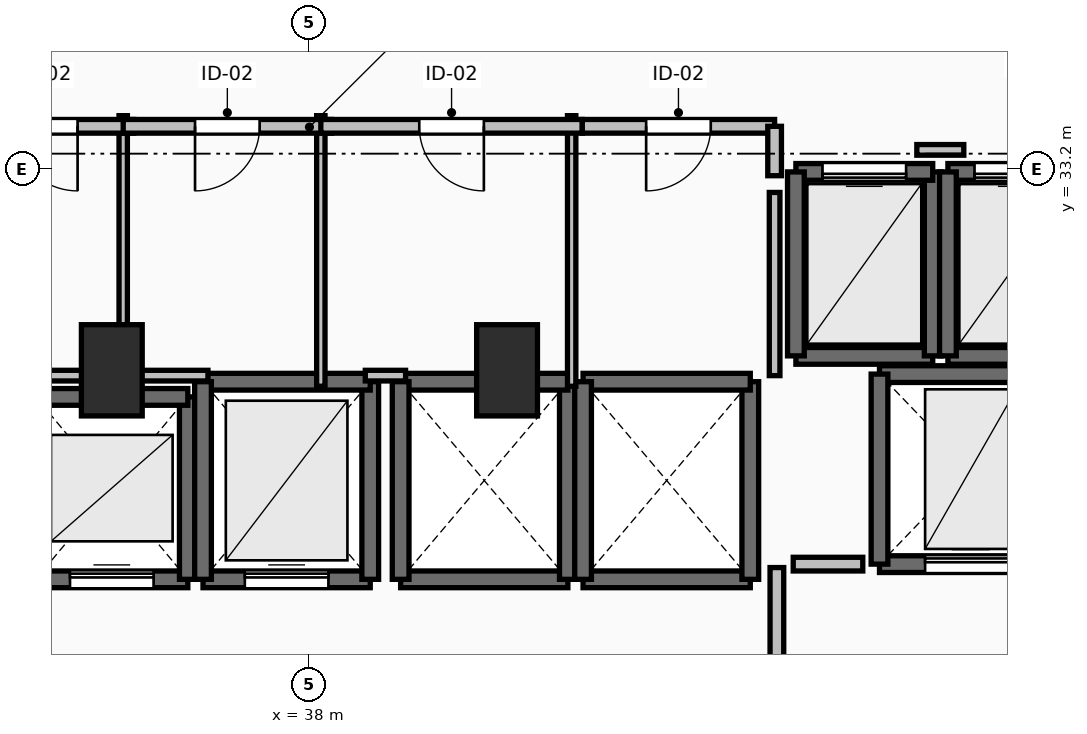
"""IFC4 building model, lengths in metres.
Left out: names, types, materials, properties, quantities, classifications, styles, units other than length and angle.
Written with IfcOpenShell. Run it as: python <this file> out.ifc"""

import sys

from ifc_helpers import new_model, si_unit, direction, frame, frame_2d, origin, origin_2d, place, context, subcontext, project, spatial, rectangle, extrude, element, fill, save


model = new_model("IFC4")
c1 = context("Model", 3, precision=1e-05, world=origin(), true_north=direction((0.0, 1.0)))
c2 = subcontext(c1, "Body", "Model", "MODEL_VIEW")
j1 = project(units=[si_unit("LENGTHUNIT", "METRE"), si_unit("PLANEANGLEUNIT", "RADIAN")], contexts=[c1])
p1 = place(None, origin())
s1 = spatial("IfcSite", under=j1, at=p1, CompositionType="ELEMENT")
p2 = place(p1, origin())
s2 = spatial("IfcBuilding", under=s1, at=p2, CompositionType="ELEMENT")
p3 = place(p2, frame((0.0, 0.0, 74.3)))
s3 = spatial("IfcBuildingStorey", under=s2, at=p3, CompositionType="ELEMENT", Elevation=74.3)
for number, where, z_axis, x_axis in (
    (1, (35.4, 30.55, 0.0), (0.0, 0.0, 1.0), (1.0, 0.0, 0.0)),
    (2, (40.6, 30.55, 0.0), (0.0, 0.0, 1.0), (1.0, 0.0, 0.0)),
):
    element("IfcColumn", number, at=place(p3, frame(where, z_axis=z_axis, x_axis=x_axis)), inside=s3, PredefinedType="PILASTER", context=c2, shape_type="SweptSolid", body=[
        extrude(rectangle(XDim=0.8, YDim=1.2, at=origin_2d()), origin(), (0.0, 0.0, 1.0), 4.5),
    ])
p4 = place(p3, frame((34.4, 27.8, 0.0), z_axis=(0.0, 0.0, 1.0), x_axis=(1.0, 0.0, 0.0)))
e3 = element("IfcWall", 3, at=p4, inside=s3, PredefinedType="SOLIDWALL", context=c2, shape_type="SweptSolid", body=[
    extrude(rectangle(XDim=2.0, YDim=0.22, at=frame_2d((1.0, 0.0))), origin(), (0.0, 0.0, 1.0), 4.24),
])
p5 = place(p4, frame((0.45, 0.0, 0.0)))
e4 = element("IfcOpeningElement", 4, at=p5, cuts=e3, PredefinedType="OPENING", context=c2, shape_type="SweptSolid", body=[
    extrude(rectangle(XDim=1.1, YDim=2.2, at=frame_2d((0.55, 1.1))), frame((0.0, 0.125, 0.0), z_axis=(0.0, -1.0, 0.0), x_axis=(1.0, 0.0, 0.0)), (0.0, 0.0, 1.0), 0.25),
])
p6 = place(p3, frame((36.4, 27.8, 0.0), z_axis=(0.0, 0.0, 1.0), x_axis=(0.0, 1.0, 0.0)))
e5 = element("IfcWall", 5, at=p6, inside=s3, PredefinedType="SOLIDWALL", context=c2, shape_type="SweptSolid", body=[
    extrude(rectangle(XDim=2.4, YDim=0.22, at=frame_2d((1.2, 0.0))), origin(), (0.0, 0.0, 1.0), 4.24),
])
p7 = place(p3, frame((36.4, 30.2, 0.0), z_axis=(0.0, 0.0, 1.0), x_axis=(-1.0, 0.0, 0.0)))
e6 = element("IfcWall", 6, at=p7, inside=s3, PredefinedType="SOLIDWALL", context=c2, shape_type="SweptSolid", body=[
    extrude(rectangle(XDim=2.0, YDim=0.22, at=frame_2d((1.0, 0.0))), origin(), (0.0, 0.0, 1.0), 4.24),
])
p8 = place(p3, frame((36.6, 27.8, 0.0), z_axis=(0.0, 0.0, 1.0), x_axis=(1.0, 0.0, 0.0)))
e7 = element("IfcWall", 7, at=p8, inside=s3, PredefinedType="SOLIDWALL", context=c2, shape_type="SweptSolid", body=[
    extrude(rectangle(XDim=2.2, YDim=0.22, at=frame_2d((1.1, 0.0))), origin(), (0.0, 0.0, 1.0), 4.24),
])
p9 = place(p8, frame((0.55, 0.0, 0.0)))
e8 = element("IfcOpeningElement", 8, at=p9, cuts=e7, PredefinedType="OPENING", context=c2, shape_type="SweptSolid", body=[
    extrude(rectangle(XDim=1.1, YDim=2.2, at=frame_2d((0.55, 1.1))), frame((0.0, 0.125, 0.0), z_axis=(0.0, -1.0, 0.0), x_axis=(1.0, 0.0, 0.0)), (0.0, 0.0, 1.0), 0.25),
])
p10 = place(p3, frame((38.8, 27.8, 0.0), z_axis=(0.0, 0.0, 1.0), x_axis=(0.0, 1.0, 0.0)))
e9 = element("IfcWall", 9, at=p10, inside=s3, PredefinedType="SOLIDWALL", context=c2, shape_type="SweptSolid", body=[
    extrude(rectangle(XDim=2.6, YDim=0.22, at=frame_2d((1.3, 0.0))), origin(), (0.0, 0.0, 1.0), 4.24),
])
p11 = place(p3, frame((38.8, 30.4, 0.0), z_axis=(0.0, 0.0, 1.0), x_axis=(-1.0, 0.0, 0.0)))
e10 = element("IfcWall", 10, at=p11, inside=s3, PredefinedType="SOLIDWALL", context=c2, shape_type="SweptSolid", body=[
    extrude(rectangle(XDim=2.2, YDim=0.22, at=frame_2d((1.1, 0.0))), origin(), (0.0, 0.0, 1.0), 4.24),
])
p12 = place(p3, frame((36.6, 30.4, 0.0), z_axis=(0.0, 0.0, 1.0), x_axis=(0.0, -1.0, 0.0)))
e11 = element("IfcWall", 11, at=p12, inside=s3, PredefinedType="SOLIDWALL", context=c2, shape_type="SweptSolid", body=[
    extrude(rectangle(XDim=2.6, YDim=0.22, at=frame_2d((1.3, 0.0))), origin(), (0.0, 0.0, 1.0), 4.24),
])
p13 = place(p3, frame((39.2, 27.8, 0.0), z_axis=(0.0, 0.0, 1.0), x_axis=(1.0, 0.0, 0.0)))
e12 = element("IfcWall", 12, at=p13, inside=s3, PredefinedType="SOLIDWALL", context=c2, shape_type="SweptSolid", body=[
    extrude(rectangle(XDim=2.2, YDim=0.22, at=frame_2d((1.1, 0.0))), origin(), (0.0, 0.0, 1.0), 4.24),
])
p14 = place(p3, frame((41.4, 27.8, 0.0), z_axis=(0.0, 0.0, 1.0), x_axis=(0.0, 1.0, 0.0)))
e13 = element("IfcWall", 13, at=p14, inside=s3, PredefinedType="SOLIDWALL", context=c2, shape_type="SweptSolid", body=[
    extrude(rectangle(XDim=2.6, YDim=0.22, at=frame_2d((1.3, 0.0))), origin(), (0.0, 0.0, 1.0), 4.24),
])
p15 = place(p3, frame((41.4, 30.4, 0.0), z_axis=(0.0, 0.0, 1.0), x_axis=(-1.0, 0.0, 0.0)))
e14 = element("IfcWall", 14, at=p15, inside=s3, PredefinedType="SOLIDWALL", context=c2, shape_type="SweptSolid", body=[
    extrude(rectangle(XDim=2.2, YDim=0.22, at=frame_2d((1.1, 0.0))), origin(), (0.0, 0.0, 1.0), 4.24),
])
p16 = place(p3, frame((39.2, 30.4, 0.0), z_axis=(0.0, 0.0, 1.0), x_axis=(0.0, -1.0, 0.0)))
e15 = element("IfcWall", 15, at=p16, inside=s3, PredefinedType="SOLIDWALL", context=c2, shape_type="SweptSolid", body=[
    extrude(rectangle(XDim=2.6, YDim=0.22, at=frame_2d((1.3, 0.0))), origin(), (0.0, 0.0, 1.0), 4.24),
])
p17 = place(p3, frame((41.6, 27.8, 0.0), z_axis=(0.0, 0.0, 1.0), x_axis=(1.0, 0.0, 0.0)))
e16 = element("IfcWall", 16, at=p17, inside=s3, PredefinedType="SOLIDWALL", context=c2, shape_type="SweptSolid", body=[
    extrude(rectangle(XDim=2.2, YDim=0.22, at=frame_2d((1.1, 0.0))), origin(), (0.0, 0.0, 1.0), 4.24),
])
p18 = place(p3, frame((43.8, 27.8, 0.0), z_axis=(0.0, 0.0, 1.0), x_axis=(0.0, 1.0, 0.0)))
e17 = element("IfcWall", 17, at=p18, inside=s3, PredefinedType="SOLIDWALL", context=c2, shape_type="SweptSolid", body=[
    extrude(rectangle(XDim=2.6, YDim=0.22, at=frame_2d((1.3, 0.0))), origin(), (0.0, 0.0, 1.0), 4.24),
])
p19 = place(p3, frame((43.8, 30.4, 0.0), z_axis=(0.0, 0.0, 1.0), x_axis=(-1.0, 0.0, 0.0)))
e18 = element("IfcWall", 18, at=p19, inside=s3, PredefinedType="SOLIDWALL", context=c2, shape_type="SweptSolid", body=[
    extrude(rectangle(XDim=2.2, YDim=0.22, at=frame_2d((1.1, 0.0))), origin(), (0.0, 0.0, 1.0), 4.24),
])
p20 = place(p3, frame((41.6, 30.4, 0.0), z_axis=(0.0, 0.0, 1.0), x_axis=(0.0, -1.0, 0.0)))
e19 = element("IfcWall", 19, at=p20, inside=s3, PredefinedType="SOLIDWALL", context=c2, shape_type="SweptSolid", body=[
    extrude(rectangle(XDim=2.6, YDim=0.22, at=frame_2d((1.3, 0.0))), origin(), (0.0, 0.0, 1.0), 4.24),
])
p21 = place(p3, frame((44.4, 30.74, 0.0), z_axis=(0.0, 0.0, 1.0), x_axis=(1.0, 0.0, 0.0)))
e20 = element("IfcWall", 20, at=p21, inside=s3, PredefinedType="SOLIDWALL", context=c2, shape_type="SweptSolid", body=[
    extrude(rectangle(XDim=1.8, YDim=0.22, at=frame_2d((0.9, 0.0))), origin(), (0.0, 0.0, 1.0), 4.24),
])
p22 = place(p3, frame((46.2, 30.74, 0.0), z_axis=(0.0, 0.0, 1.0), x_axis=(0.0, 1.0, 0.0)))
e21 = element("IfcWall", 21, at=p22, inside=s3, PredefinedType="SOLIDWALL", context=c2, shape_type="SweptSolid", body=[
    extrude(rectangle(XDim=2.42, YDim=0.22, at=frame_2d((1.21, 0.0))), origin(), (0.0, 0.0, 1.0), 4.24),
])
p23 = place(p3, frame((46.2, 33.16, 0.0), z_axis=(0.0, 0.0, 1.0), x_axis=(-1.0, 0.0, 0.0)))
e22 = element("IfcWall", 22, at=p23, inside=s3, PredefinedType="SOLIDWALL", context=c2, shape_type="SweptSolid", body=[
    extrude(rectangle(XDim=1.8, YDim=0.22, at=frame_2d((0.9, 0.0))), origin(), (0.0, 0.0, 1.0), 4.24),
])
p24 = place(p23, frame((0.35, 0.0, 0.0)))
e23 = element("IfcOpeningElement", 23, at=p24, cuts=e22, PredefinedType="OPENING", context=c2, shape_type="SweptSolid", body=[
    extrude(rectangle(XDim=1.1, YDim=2.2, at=frame_2d((0.55, 1.1))), frame((0.0, 0.125, 0.0), z_axis=(0.0, -1.0, 0.0), x_axis=(1.0, 0.0, 0.0)), (0.0, 0.0, 1.0), 0.25),
])
p25 = place(p3, frame((44.4, 33.16, 0.0), z_axis=(0.0, 0.0, 1.0), x_axis=(0.0, -1.0, 0.0)))
e24 = element("IfcWall", 24, at=p25, inside=s3, PredefinedType="SOLIDWALL", context=c2, shape_type="SweptSolid", body=[
    extrude(rectangle(XDim=2.42, YDim=0.22, at=frame_2d((1.21, 0.0))), origin(), (0.0, 0.0, 1.0), 4.24),
])
p26 = place(p3, frame((46.4, 30.74, 0.0), z_axis=(0.0, 0.0, 1.0), x_axis=(1.0, 0.0, 0.0)))
e25 = element("IfcWall", 25, at=p26, inside=s3, PredefinedType="SOLIDWALL", context=c2, shape_type="SweptSolid", body=[
    extrude(rectangle(XDim=1.8, YDim=0.22, at=frame_2d((0.9, 0.0))), origin(), (0.0, 0.0, 1.0), 4.24),
])
p27 = place(p3, frame((48.2, 33.16, 0.0), z_axis=(0.0, 0.0, 1.0), x_axis=(-1.0, 0.0, 0.0)))
e26 = element("IfcWall", 26, at=p27, inside=s3, PredefinedType="SOLIDWALL", context=c2, shape_type="SweptSolid", body=[
    extrude(rectangle(XDim=1.8, YDim=0.22, at=frame_2d((0.9, 0.0))), origin(), (0.0, 0.0, 1.0), 4.24),
])
p28 = place(p27, frame((0.35, 0.0, 0.0)))
e27 = element("IfcOpeningElement", 27, at=p28, cuts=e26, PredefinedType="OPENING", context=c2, shape_type="SweptSolid", body=[
    extrude(rectangle(XDim=1.1, YDim=2.2, at=frame_2d((0.55, 1.1))), frame((0.0, 0.125, 0.0), z_axis=(0.0, -1.0, 0.0), x_axis=(1.0, 0.0, 0.0)), (0.0, 0.0, 1.0), 0.25),
])
p29 = place(p3, frame((46.4, 33.16, 0.0), z_axis=(0.0, 0.0, 1.0), x_axis=(0.0, -1.0, 0.0)))
e28 = element("IfcWall", 28, at=p29, inside=s3, PredefinedType="SOLIDWALL", context=c2, shape_type="SweptSolid", body=[
    extrude(rectangle(XDim=2.42, YDim=0.22, at=frame_2d((1.21, 0.0))), origin(), (0.0, 0.0, 1.0), 4.24),
])
p30 = place(p3, frame((45.5, 28.0, 0.0), z_axis=(0.0, 0.0, 1.0), x_axis=(1.0, 0.0, 0.0)))
e29 = element("IfcWall", 29, at=p30, inside=s3, PredefinedType="SHEAR", context=c2, shape_type="SweptSolid", body=[
    extrude(rectangle(XDim=2.4, YDim=0.22, at=frame_2d((1.2, 0.0))), origin(), (0.0, 0.0, 1.0), 4.24),
])
p31 = place(p30, frame((0.6, 0.0, 0.0)))
e30 = element("IfcOpeningElement", 30, at=p31, cuts=e29, PredefinedType="OPENING", context=c2, shape_type="SweptSolid", body=[
    extrude(rectangle(XDim=1.2, YDim=2.2, at=frame_2d((0.6, 1.1))), frame((0.0, 0.125, 0.0), z_axis=(0.0, -1.0, 0.0), x_axis=(1.0, 0.0, 0.0)), (0.0, 0.0, 1.0), 0.25),
])
p32 = place(p3, frame((47.9, 30.5, 0.0), z_axis=(0.0, 0.0, 1.0), x_axis=(-1.0, 0.0, 0.0)))
e31 = element("IfcWall", 31, at=p32, inside=s3, PredefinedType="SHEAR", context=c2, shape_type="SweptSolid", body=[
    extrude(rectangle(XDim=2.4, YDim=0.22, at=frame_2d((1.2, 0.0))), origin(), (0.0, 0.0, 1.0), 4.24),
])
p33 = place(p3, frame((45.5, 30.5, 0.0), z_axis=(0.0, 0.0, 1.0), x_axis=(0.0, -1.0, 0.0)))
e32 = element("IfcWall", 32, at=p33, inside=s3, PredefinedType="SHEAR", context=c2, shape_type="SweptSolid", body=[
    extrude(rectangle(XDim=2.5, YDim=0.22, at=frame_2d((1.25, 0.0))), origin(), (0.0, 0.0, 1.0), 4.24),
])
p34 = place(p3, frame((44.15, 27.955, 0.0), z_axis=(0.0, 0.0, 1.0), x_axis=(0.0, -1.0, 0.0)))
e33 = element("IfcWall", 33, at=p34, inside=s3, PredefinedType="PARTITIONING", context=c2, shape_type="SweptSolid", body=[
    extrude(rectangle(XDim=3.91, YDim=0.18, at=frame_2d((1.955, 0.0))), origin(), (0.0, 0.0, 1.0), 4.24),
])
p35 = place(p34, frame((1.355, 0.0, 0.0)))
e34 = element("IfcOpeningElement", 34, at=p35, cuts=e33, PredefinedType="OPENING", context=c2, shape_type="SweptSolid", body=[
    extrude(rectangle(XDim=1.2, YDim=2.15, at=frame_2d((0.6, 1.075))), frame((0.0, 0.105, 0.0), z_axis=(0.0, -1.0, 0.0), x_axis=(1.0, 0.0, 0.0)), (0.0, 0.0, 1.0), 0.21),
])
p36 = place(p3, frame((35.55, 30.34, 0.0), z_axis=(0.0, 0.0, 1.0), x_axis=(0.0, 1.0, 0.0)))
e35 = element("IfcWall", 35, at=p36, inside=s3, PredefinedType="PARTITIONING", context=c2, shape_type="SweptSolid", body=[
    extrude(rectangle(XDim=3.56, YDim=0.11, at=frame_2d((1.78, 0.0))), origin(), (0.0, 0.0, 1.0), 3.432),
])
p37 = place(p3, frame((35.69, 33.76, 0.0), z_axis=(0.0, 0.0, 1.0), x_axis=(-1.0, 0.0, 0.0)))
e36 = element("IfcWall", 36, at=p37, inside=s3, PredefinedType="PARTITIONING", context=c2, shape_type="SweptSolid", body=[
    extrude(rectangle(XDim=2.33, YDim=0.18, at=frame_2d((1.165, 0.0))), origin(), (0.0, 0.0, 1.0), 4.24),
])
p38 = place(p37, frame((0.74, 0.0, 0.0)))
e37 = element("IfcOpeningElement", 37, at=p38, cuts=e36, PredefinedType="OPENING", context=c2, shape_type="SweptSolid", body=[
    extrude(rectangle(XDim=0.85, YDim=2.1, at=frame_2d((0.425, 1.05))), frame((0.0, 0.105, 0.0), z_axis=(0.0, -1.0, 0.0), x_axis=(1.0, 0.0, 0.0)), (0.0, 0.0, 1.0), 0.21),
])
p39 = place(p3, frame((38.15, 30.34, 0.0), z_axis=(0.0, 0.0, 1.0), x_axis=(0.0, 1.0, 0.0)))
e38 = element("IfcWall", 38, at=p39, inside=s3, PredefinedType="PARTITIONING", context=c2, shape_type="SweptSolid", body=[
    extrude(rectangle(XDim=3.56, YDim=0.11, at=frame_2d((1.78, 0.0))), origin(), (0.0, 0.0, 1.0), 3.432),
])
p40 = place(p3, frame((38.29, 33.76, 0.0), z_axis=(0.0, 0.0, 1.0), x_axis=(-1.0, 0.0, 0.0)))
e39 = element("IfcWall", 39, at=p40, inside=s3, PredefinedType="PARTITIONING", context=c2, shape_type="SweptSolid", body=[
    extrude(rectangle(XDim=2.74, YDim=0.18, at=frame_2d((1.37, 0.0))), origin(), (0.0, 0.0, 1.0), 4.24),
])
p41 = place(p40, frame((0.945, 0.0, 0.0)))
e40 = element("IfcOpeningElement", 40, at=p41, cuts=e39, PredefinedType="OPENING", context=c2, shape_type="SweptSolid", body=[
    extrude(rectangle(XDim=0.85, YDim=2.1, at=frame_2d((0.425, 1.05))), frame((0.0, 0.105, 0.0), z_axis=(0.0, -1.0, 0.0), x_axis=(1.0, 0.0, 0.0)), (0.0, 0.0, 1.0), 0.21),
])
p42 = place(p3, frame((41.45, 30.34, 0.0), z_axis=(0.0, 0.0, 1.0), x_axis=(0.0, 1.0, 0.0)))
e41 = element("IfcWall", 41, at=p42, inside=s3, PredefinedType="PARTITIONING", context=c2, shape_type="SweptSolid", body=[
    extrude(rectangle(XDim=3.56, YDim=0.11, at=frame_2d((1.78, 0.0))), origin(), (0.0, 0.0, 1.0), 4.24),
])
p43 = place(p3, frame((41.59, 33.76, 0.0), z_axis=(0.0, 0.0, 1.0), x_axis=(-1.0, 0.0, 0.0)))
e42 = element("IfcWall", 42, at=p43, inside=s3, PredefinedType="PARTITIONING", context=c2, shape_type="SweptSolid", body=[
    extrude(rectangle(XDim=3.44, YDim=0.18, at=frame_2d((1.72, 0.0))), origin(), (0.0, 0.0, 1.0), 4.24),
])
p44 = place(p43, frame((1.295, 0.0, 0.0)))
e43 = element("IfcOpeningElement", 43, at=p44, cuts=e42, PredefinedType="OPENING", context=c2, shape_type="SweptSolid", body=[
    extrude(rectangle(XDim=0.85, YDim=2.1, at=frame_2d((0.425, 1.05))), frame((0.0, 0.105, 0.0), z_axis=(0.0, -1.0, 0.0), x_axis=(1.0, 0.0, 0.0)), (0.0, 0.0, 1.0), 0.21),
])
p45 = place(p3, frame((44.12, 33.76, 0.0), z_axis=(0.0, 0.0, 1.0), x_axis=(-1.0, 0.0, 0.0)))
e44 = element("IfcWall", 44, at=p45, inside=s3, PredefinedType="PARTITIONING", context=c2, shape_type="SweptSolid", body=[
    extrude(rectangle(XDim=2.53, YDim=0.18, at=frame_2d((1.265, 0.0))), origin(), (0.0, 0.0, 1.0), 4.24),
])
p46 = place(p45, frame((0.84, 0.0, 0.0)))
e45 = element("IfcOpeningElement", 45, at=p46, cuts=e44, PredefinedType="OPENING", context=c2, shape_type="SweptSolid", body=[
    extrude(rectangle(XDim=0.85, YDim=2.1, at=frame_2d((0.425, 1.05))), frame((0.0, 0.105, 0.0), z_axis=(0.0, -1.0, 0.0), x_axis=(1.0, 0.0, 0.0)), (0.0, 0.0, 1.0), 0.21),
])
p47 = place(p3, frame((44.12, 33.11, 0.0), z_axis=(0.0, 0.0, 1.0), x_axis=(0.0, 1.0, 0.0)))
e46 = element("IfcWall", 46, at=p47, inside=s3, PredefinedType="PARTITIONING", context=c2, shape_type="SweptSolid", body=[
    extrude(rectangle(XDim=0.65, YDim=0.18, at=frame_2d((0.325, 0.0))), origin(), (0.0, 0.0, 1.0), 4.24),
])
p48 = place(p3, frame((45.28, 28.0, 0.0), z_axis=(0.0, 0.0, 1.0), x_axis=(-1.0, 0.0, 0.0)))
e47 = element("IfcWall", 47, at=p48, inside=s3, PredefinedType="PARTITIONING", context=c2, shape_type="SweptSolid", body=[
    extrude(rectangle(XDim=0.915, YDim=0.18, at=frame_2d((0.458, 0.0))), origin(), (0.0, 0.0, 1.0), 4.24),
])
p49 = place(p3, frame((33.44, 30.48, 0.0), z_axis=(0.0, 0.0, 1.0), x_axis=(1.0, 0.0, 0.0)))
e48 = element("IfcWall", 48, at=p49, inside=s3, PredefinedType="PARTITIONING", context=c2, shape_type="SweptSolid", body=[
    extrude(rectangle(XDim=2.14, YDim=0.14, at=frame_2d((1.07, 0.0))), origin(), (0.0, 0.0, 1.0), 3.432),
])
p50 = place(p3, frame((35.6, 30.48, 0.0), z_axis=(0.0, 0.0, 1.0), x_axis=(1.0, 0.0, 0.0)))
e49 = element("IfcWall", 49, at=p50, inside=s3, PredefinedType="PARTITIONING", context=c2, shape_type="SweptSolid", body=[
    extrude(rectangle(XDim=1.065, YDim=0.14, at=frame_2d((0.532, 0.0))), origin(), (0.0, 0.0, 1.0), 3.432),
])
p51 = place(p3, frame((38.735, 30.48, 0.0), z_axis=(0.0, 0.0, 1.0), x_axis=(1.0, 0.0, 0.0)))
e50 = element("IfcWall", 50, at=p51, inside=s3, PredefinedType="PARTITIONING", context=c2, shape_type="SweptSolid", body=[
    extrude(rectangle(XDim=0.53, YDim=0.14, at=frame_2d((0.265, 0.0))), origin(), (0.0, 0.0, 1.0), 3.432),
])
p52 = place(p3, frame((44.12, 30.48, 0.0), z_axis=(0.0, 0.0, 1.0), x_axis=(0.0, 1.0, 0.0)))
e51 = element("IfcWall", 51, at=p52, inside=s3, PredefinedType="PARTITIONING", context=c2, shape_type="SweptSolid", body=[
    extrude(rectangle(XDim=2.41, YDim=0.14, at=frame_2d((1.205, 0.0))), origin(), (0.0, 0.0, 1.0), 4.24),
])
p53 = place(p3, frame((45.991, 33.45, 0.0), z_axis=(0.0, 0.0, 1.0), x_axis=(1.0, 0.0, 0.0)))
e52 = element("IfcWall", 52, at=p53, inside=s3, PredefinedType="PARTITIONING", context=c2, shape_type="SweptSolid", body=[
    extrude(rectangle(XDim=0.618, YDim=0.14, at=frame_2d((0.309, 0.0))), origin(), (0.0, 0.0, 1.0), 4.24),
])
p54 = place(p5, origin())
e53 = element("IfcDoor", 53, at=p54, inside=s3, OperationType="SLIDING_TO_LEFT", PredefinedType="DOOR", context=c2, shape_type="SweptSolid", body=[
    extrude(rectangle(XDim=1.1, YDim=2.2, at=frame_2d((0.55, 1.1))), frame((0.0, 0.025, 0.0), z_axis=(0.0, -1.0, 0.0), x_axis=(1.0, 0.0, 0.0)), (0.0, 0.0, 1.0), 0.05),
])
fill(e4, e53)
p55 = place(p9, origin())
e54 = element("IfcDoor", 54, at=p55, inside=s3, OperationType="SLIDING_TO_LEFT", PredefinedType="DOOR", context=c2, shape_type="SweptSolid", body=[
    extrude(rectangle(XDim=1.1, YDim=2.2, at=frame_2d((0.55, 1.1))), frame((0.0, 0.025, 0.0), z_axis=(0.0, -1.0, 0.0), x_axis=(1.0, 0.0, 0.0)), (0.0, 0.0, 1.0), 0.05),
])
fill(e8, e54)
p56 = place(p24, origin())
e55 = element("IfcDoor", 55, at=p56, inside=s3, OperationType="SLIDING_TO_LEFT", PredefinedType="DOOR", context=c2, shape_type="SweptSolid", body=[
    extrude(rectangle(XDim=1.1, YDim=2.2, at=frame_2d((0.55, 1.1))), frame((0.0, 0.025, 0.0), z_axis=(0.0, -1.0, 0.0), x_axis=(1.0, 0.0, 0.0)), (0.0, 0.0, 1.0), 0.05),
])
fill(e23, e55)
p57 = place(p28, origin())
e56 = element("IfcDoor", 56, at=p57, inside=s3, OperationType="SLIDING_TO_LEFT", PredefinedType="DOOR", context=c2, shape_type="SweptSolid", body=[
    extrude(rectangle(XDim=1.1, YDim=2.2, at=frame_2d((0.55, 1.1))), frame((0.0, 0.025, 0.0), z_axis=(0.0, -1.0, 0.0), x_axis=(1.0, 0.0, 0.0)), (0.0, 0.0, 1.0), 0.05),
])
fill(e27, e56)
p58 = place(p31, origin())
e57 = element("IfcDoor", 57, at=p58, inside=s3, OperationType="SLIDING_TO_LEFT", PredefinedType="DOOR", context=c2, shape_type="SweptSolid", body=[
    extrude(rectangle(XDim=1.2, YDim=2.2, at=frame_2d((0.6, 1.1))), frame((0.0, 0.025, 0.0), z_axis=(0.0, -1.0, 0.0), x_axis=(1.0, 0.0, 0.0)), (0.0, 0.0, 1.0), 0.05),
])
fill(e30, e57)
p59 = place(p38, origin())
e58 = element("IfcDoor", 58, at=p59, inside=s3, OperationType="SINGLE_SWING_LEFT", PredefinedType="DOOR", context=c2, shape_type="SweptSolid", body=[
    extrude(rectangle(XDim=0.85, YDim=2.1, at=frame_2d((0.425, 1.05))), frame((0.0, 0.025, 0.0), z_axis=(0.0, -1.0, 0.0), x_axis=(1.0, 0.0, 0.0)), (0.0, 0.0, 1.0), 0.05),
])
fill(e37, e58)
p60 = place(p41, origin())
e59 = element("IfcDoor", 59, at=p60, inside=s3, OperationType="SINGLE_SWING_RIGHT", PredefinedType="DOOR", context=c2, shape_type="SweptSolid", body=[
    extrude(rectangle(XDim=0.85, YDim=2.1, at=frame_2d((0.425, 1.05))), frame((0.0, 0.025, 0.0), z_axis=(0.0, -1.0, 0.0), x_axis=(1.0, 0.0, 0.0)), (0.0, 0.0, 1.0), 0.05),
])
fill(e40, e59)
p61 = place(p44, origin())
e60 = element("IfcDoor", 60, at=p61, inside=s3, OperationType="SINGLE_SWING_LEFT", PredefinedType="DOOR", context=c2, shape_type="SweptSolid", body=[
    extrude(rectangle(XDim=0.85, YDim=2.1, at=frame_2d((0.425, 1.05))), frame((0.0, 0.025, 0.0), z_axis=(0.0, -1.0, 0.0), x_axis=(1.0, 0.0, 0.0)), (0.0, 0.0, 1.0), 0.05),
])
fill(e43, e60)
p62 = place(p46, origin())
e61 = element("IfcDoor", 61, at=p62, inside=s3, OperationType="SINGLE_SWING_RIGHT", PredefinedType="DOOR", context=c2, shape_type="SweptSolid", body=[
    extrude(rectangle(XDim=0.85, YDim=2.1, at=frame_2d((0.425, 1.05))), frame((0.0, 0.025, 0.0), z_axis=(0.0, -1.0, 0.0), x_axis=(1.0, 0.0, 0.0)), (0.0, 0.0, 1.0), 0.05),
])
fill(e45, e61)
save(model, sys.argv[1])
